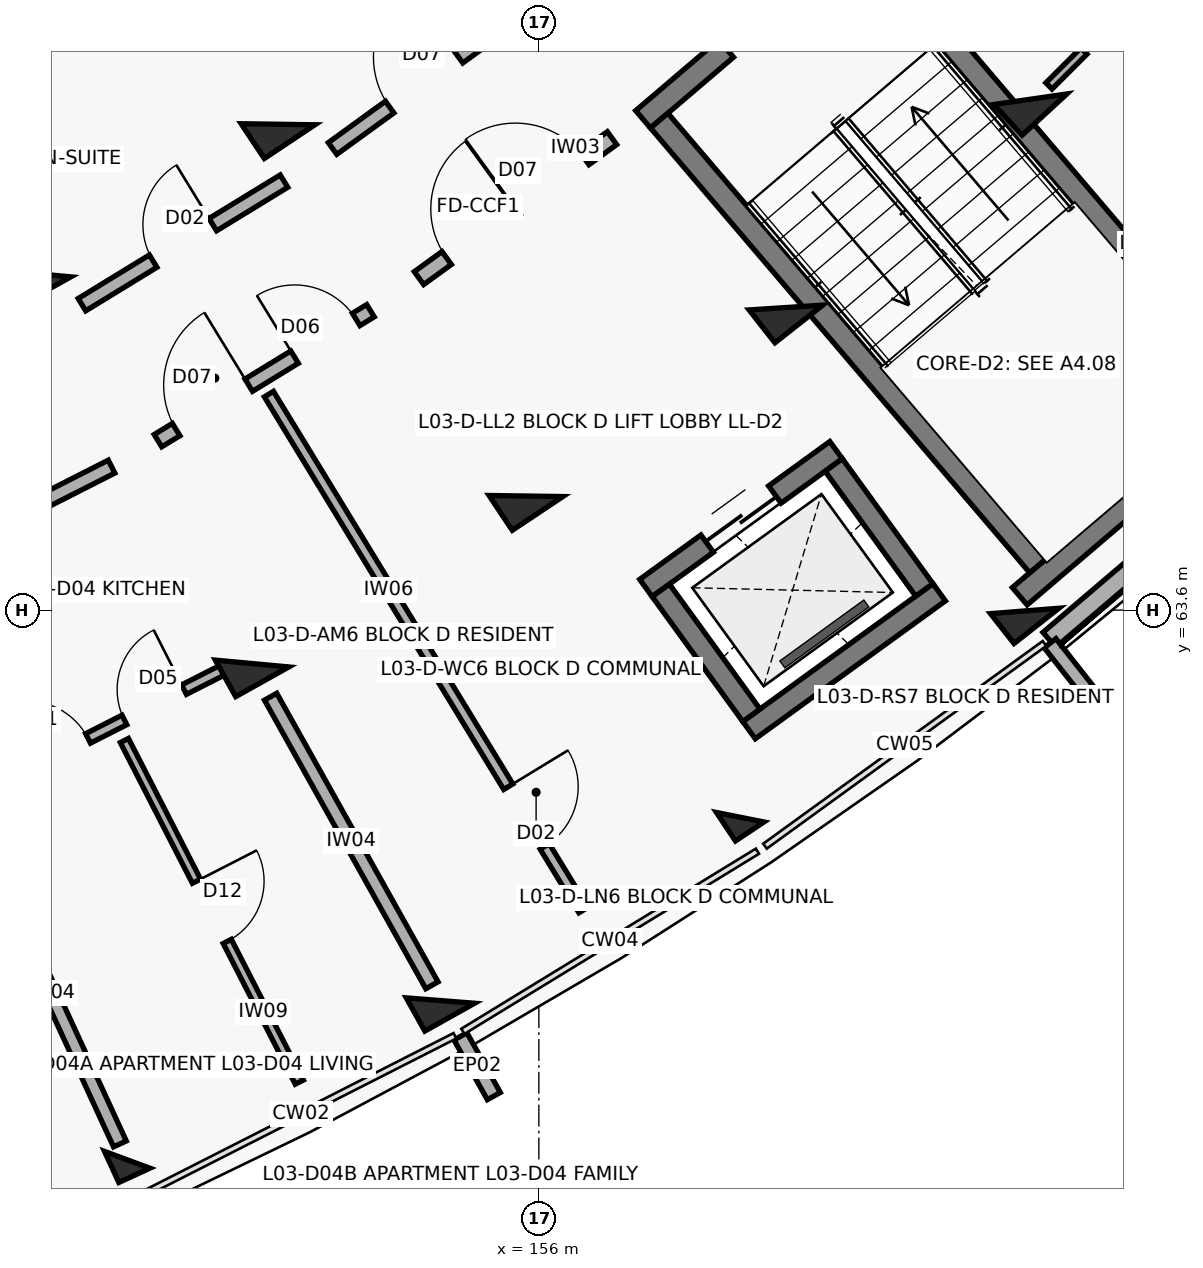
"""IFC4 building model, lengths in metres.
Left out: names, types, materials, properties, quantities, classifications, styles, units other than length and angle.
Written with IfcOpenShell. Run it as: python <this file> out.ifc"""

import sys

from ifc_helpers import new_model, si_unit, direction, frame, frame_2d, origin, origin_2d, place, context, subcontext, project, spatial, rectangle, extrude, element, fill, save


model = new_model("IFC4")
c1 = context("Model", 3, precision=1e-05, world=origin(), true_north=direction((0.0, 1.0)))
c2 = subcontext(c1, "Body", "Model", "MODEL_VIEW")
j1 = project(units=[si_unit("LENGTHUNIT", "METRE"), si_unit("PLANEANGLEUNIT", "RADIAN")], contexts=[c1])
p1 = place(None, origin())
s1 = spatial("IfcSite", under=j1, at=p1, CompositionType="ELEMENT")
p2 = place(p1, origin())
s2 = spatial("IfcBuilding", under=s1, at=p2, CompositionType="ELEMENT")
p3 = place(p2, frame((0.0, 0.0, 11.2)))
s3 = spatial("IfcBuildingStorey", under=s2, at=p3, CompositionType="ELEMENT", Elevation=11.2)
p4 = place(p3, frame((150.584, 56.367, 0.0), z_axis=(0.0, 0.0, 1.0), x_axis=(0.417867073801, -0.908508177527, 0.0)))
e1 = element("IfcColumn", 1, at=p4, inside=s3, PredefinedType="COLUMN", context=c2, shape_type="SweptSolid", body=[
    extrude(rectangle(XDim=0.45, YDim=0.45, at=origin_2d()), origin(), (0.0, 0.0, 1.0), 3.1),
])
for number, where, z_axis, x_axis in (
    (2, (149.358, 68.03, 0.0), (0.0, 0.0, 1.0), (0.488, -0.873, 0.0)),
    (3, (152.227, 62.897, 0.0), (0.0, 0.0, 1.0), (0.488, -0.873, 0.0)),
):
    element("IfcColumn", number, at=place(p3, frame(where, z_axis=z_axis, x_axis=x_axis)), inside=s3, PredefinedType="COLUMN", context=c2, shape_type="SweptSolid", body=[
        extrude(rectangle(XDim=0.55, YDim=0.8, at=origin_2d()), origin(), (0.0, 0.0, 1.0), 3.1),
    ])
p5 = place(p3, frame((154.705, 58.462, 0.0), z_axis=(0.0, 0.0, 1.0), x_axis=(0.487859659139, -0.87292207727, 0.0)))
e4 = element("IfcColumn", 4, at=p5, inside=s3, PredefinedType="COLUMN", context=c2, shape_type="SweptSolid", body=[
    extrude(rectangle(XDim=0.5, YDim=0.75, at=origin_2d()), origin(), (0.0, 0.0, 1.0), 3.1),
])
for number, where, z_axis, x_axis in (
    (5, (152.568, 69.993, 0.0), (0.0, 0.0, 1.0), (0.555, -0.832, 0.0)),
    (6, (155.831, 65.101, 0.0), (0.0, 0.0, 1.0), (0.555, -0.832, 0.0)),
):
    element("IfcColumn", number, at=place(p3, frame(where, z_axis=z_axis, x_axis=x_axis)), inside=s3, PredefinedType="COLUMN", context=c2, shape_type="SweptSolid", body=[
        extrude(rectangle(XDim=0.55, YDim=0.8, at=origin_2d()), origin(), (0.0, 0.0, 1.0), 3.1),
    ])
p6 = place(p3, frame((158.649, 60.875, 0.0), z_axis=(0.0, 0.0, 1.0), x_axis=(0.554844427448, -0.83195412213, 0.0)))
e7 = element("IfcColumn", 7, at=p6, inside=s3, PredefinedType="COLUMN", context=c2, shape_type="SweptSolid", body=[
    extrude(rectangle(XDim=0.45, YDim=0.45, at=origin_2d()), origin(), (0.0, 0.0, 1.0), 3.1),
])
p7 = place(p3, frame((159.25, 67.581, 0.0), z_axis=(0.0, 0.0, 1.0), x_axis=(0.618408395358, -0.785856893175, 0.0)))
e8 = element("IfcColumn", 8, at=p7, inside=s3, PredefinedType="COLUMN", context=c2, shape_type="SweptSolid", body=[
    extrude(rectangle(XDim=0.55, YDim=0.8, at=origin_2d()), origin(), (0.0, 0.0, 1.0), 3.1),
])
p8 = place(p3, frame((162.392, 63.589, 0.0), z_axis=(0.0, 0.0, 1.0), x_axis=(0.618408395358, -0.785856893175, 0.0)))
e9 = element("IfcColumn", 9, at=p8, inside=s3, PredefinedType="COLUMN", context=c2, shape_type="SweptSolid", body=[
    extrude(rectangle(XDim=0.5, YDim=0.75, at=origin_2d()), origin(), (0.0, 0.0, 1.0), 3.1),
])
p9 = place(p3, frame((162.465, 70.322, 0.0), z_axis=(0.0, 0.0, 1.0), x_axis=(0.678159669868, -0.73491459515, 0.0)))
e10 = element("IfcColumn", 10, at=p9, inside=s3, PredefinedType="COLUMN", context=c2, shape_type="SweptSolid", body=[
    extrude(rectangle(XDim=0.55, YDim=0.8, at=origin_2d()), origin(), (0.0, 0.0, 1.0), 3.1),
])
p10 = place(p3, frame((154.969, 57.991, 0.0), z_axis=(0.0, 0.0, 1.0), x_axis=(0.487967253808, -0.872861935939, 0.0)))
e11 = element("IfcWall", 11, at=p10, inside=s3, PredefinedType="PARAPET", context=c2, shape_type="SweptSolid", body=[
    extrude(rectangle(XDim=0.9, YDim=0.195, at=frame_2d((0.45, 0.0))), origin(), (0.0, 0.0, 1.0), 2.25),
])
p11 = place(p3, frame((147.765, 70.921, 0.0), z_axis=(0.0, 0.0, 1.0), x_axis=(0.85310231885, 0.521743647371, 0.0)))
e12 = element("IfcWall", 12, at=p11, inside=s3, PredefinedType="SOLIDWALL", context=c2, shape_type="SweptSolid", body=[
    extrude(rectangle(XDim=3.464, YDim=0.245, at=frame_2d((1.732, 0.0))), origin(), (0.0, 0.0, 1.0), 2.25),
])
p12 = place(p11, frame((0.4, 0.0, 0.0)))
e13 = element("IfcOpeningElement", 13, at=p12, cuts=e12, PredefinedType="OPENING", context=c2, shape_type="SweptSolid", body=[
    extrude(rectangle(XDim=1.1, YDim=2.15, at=frame_2d((0.55, 1.075))), frame((0.0, 0.133, 0.0), z_axis=(0.0, -1.0, 0.0), x_axis=(1.0, 0.0, 0.0)), (0.0, 0.0, 1.0), 0.265),
])
p13 = place(p3, frame((162.716, 63.209, 0.0), z_axis=(0.0, 0.0, 1.0), x_axis=(0.760968923704, 0.64878833001, 0.0)))
e14 = element("IfcWall", 14, at=p13, inside=s3, PredefinedType="SOLIDWALL", context=c2, shape_type="SweptSolid", body=[
    extrude(rectangle(XDim=4.623, YDim=0.258, at=frame_2d((2.311, 0.0))), origin(), (0.0, 0.0, 1.0), 2.25),
])
p14 = place(p3, frame((162.726, 63.164, 0.0), z_axis=(0.0, 0.0, 1.0), x_axis=(0.618456270212, -0.785819217019, 0.0)))
e15 = element("IfcWall", 15, at=p14, inside=s3, PredefinedType="PARAPET", context=c2, shape_type="SweptSolid", body=[
    extrude(rectangle(XDim=0.9, YDim=0.195, at=frame_2d((0.45, 0.0))), origin(), (0.0, 0.0, 1.0), 2.25),
])
p15 = place(p3, frame((157.372, 70.058, 0.0), z_axis=(0.0, 0.0, 1.0), x_axis=(0.760990583254, 0.648762924495, 0.0)))
e16 = element("IfcWall", 16, at=p15, inside=s3, PredefinedType="SHEAR", context=c2, shape_type="SweptSolid", body=[
    extrude(rectangle(XDim=3.87, YDim=0.3, at=frame_2d((1.935, 0.0))), origin(), (0.0, 0.0, 1.0), 3.1),
])
p16 = place(p15, frame((1.435, 0.0, 0.0)))
e17 = element("IfcOpeningElement", 17, at=p16, cuts=e16, PredefinedType="OPENING", context=c2, shape_type="SweptSolid", body=[
    extrude(rectangle(XDim=1.0, YDim=2.15, at=frame_2d((0.5, 1.075))), frame((0.0, 0.16, 0.0), z_axis=(0.0, -1.0, 0.0), x_axis=(1.0, 0.0, 0.0)), (0.0, 0.0, 1.0), 0.32),
])
p17 = place(p3, frame((162.327, 63.783, 0.0), z_axis=(0.0, 0.0, 1.0), x_axis=(0.760969560012, 0.648787583678, 0.0)))
e18 = element("IfcWall", 18, at=p17, inside=s3, PredefinedType="SHEAR", context=c2, shape_type="SweptSolid", body=[
    extrude(rectangle(XDim=4.47, YDim=0.3, at=frame_2d((2.235, 0.0))), origin(), (0.0, 0.0, 1.0), 3.1),
])
p18 = place(p3, frame((157.583, 70.041, 0.0), z_axis=(0.0, 0.0, 1.0), x_axis=(0.648762810187, -0.760990680704, 0.0)))
e19 = element("IfcWall", 19, at=p18, inside=s3, PredefinedType="SHEAR", context=c2, shape_type="SweptSolid", body=[
    extrude(rectangle(XDim=7.69, YDim=0.3, at=frame_2d((3.845, 0.0))), origin(), (0.0, 0.0, 1.0), 3.1),
])
p19 = place(p3, frame((160.3, 72.357, 0.0), z_axis=(0.0, 0.0, 1.0), x_axis=(0.648781194888, -0.760975006922, 0.0)))
e20 = element("IfcWall", 20, at=p19, inside=s3, PredefinedType="SHEAR", context=c2, shape_type="SweptSolid", body=[
    extrude(rectangle(XDim=7.69, YDim=0.3, at=frame_2d((3.845, 0.0))), origin(), (0.0, 0.0, 1.0), 3.1),
])
p20 = place(p3, frame((157.409, 63.89, 0.0), z_axis=(0.0, 0.0, 1.0), x_axis=(0.809510936031, 0.587104798521, 0.0)))
e21 = element("IfcWall", 21, at=p20, inside=s3, PredefinedType="SHEAR", context=c2, shape_type="SweptSolid", body=[
    extrude(rectangle(XDim=3.09, YDim=0.28, at=frame_2d((1.545, 0.0))), origin(), (0.0, 0.0, 1.0), 3.1),
])
p21 = place(p20, frame((0.995, 0.0, 0.0)))
e22 = element("IfcOpeningElement", 22, at=p21, cuts=e21, PredefinedType="OPENING", context=c2, shape_type="SweptSolid", body=[
    extrude(rectangle(XDim=1.1, YDim=2.15, at=frame_2d((0.55, 1.075))), frame((0.0, 0.15, 0.0), z_axis=(0.0, -1.0, 0.0), x_axis=(1.0, 0.0, 0.0)), (0.0, 0.0, 1.0), 0.3),
])
p22 = place(p3, frame((158.765, 62.021, 0.0), z_axis=(0.0, 0.0, 1.0), x_axis=(0.809548485838, 0.587053020669, 0.0)))
e23 = element("IfcWall", 23, at=p22, inside=s3, PredefinedType="SHEAR", context=c2, shape_type="SweptSolid", body=[
    extrude(rectangle(XDim=3.09, YDim=0.28, at=frame_2d((1.545, 0.0))), origin(), (0.0, 0.0, 1.0), 3.1),
])
p23 = place(p3, frame((157.604, 63.859, 0.0), z_axis=(0.0, 0.0, 1.0), x_axis=(0.587127188998, -0.809494696671, 0.0)))
e24 = element("IfcWall", 24, at=p23, inside=s3, PredefinedType="SHEAR", context=c2, shape_type="SweptSolid", body=[
    extrude(rectangle(XDim=2.03, YDim=0.28, at=frame_2d((1.015, 0.0))), origin(), (0.0, 0.0, 1.0), 3.1),
])
p24 = place(p3, frame((159.879, 65.509, 0.0), z_axis=(0.0, 0.0, 1.0), x_axis=(0.58704837408, -0.809551855344, 0.0)))
e25 = element("IfcWall", 25, at=p24, inside=s3, PredefinedType="SHEAR", context=c2, shape_type="SweptSolid", body=[
    extrude(rectangle(XDim=2.03, YDim=0.28, at=frame_2d((1.015, 0.0))), origin(), (0.0, 0.0, 1.0), 3.1),
])
p25 = place(p3, frame((147.457, 64.003, 0.0), z_axis=(0.0, 0.0, 1.0), x_axis=(0.891412167565, 0.45319349898, 0.0)))
e26 = element("IfcWall", 26, at=p25, inside=s3, PredefinedType="SOLIDWALL", context=c2, shape_type="SweptSolid", body=[
    extrude(rectangle(XDim=3.277, YDim=0.19, at=frame_2d((1.639, 0.0))), origin(), (0.0, 0.0, 1.0), 2.08),
])
p26 = place(p25, frame((1.148, 0.0, 0.0)))
e27 = element("IfcOpeningElement", 27, at=p26, cuts=e26, PredefinedType="OPENING", context=c2, shape_type="SweptSolid", body=[
    extrude(rectangle(XDim=0.98, YDim=2.15, at=frame_2d((0.49, 1.075))), frame((0.0, 0.105, 0.0), z_axis=(0.0, -1.0, 0.0), x_axis=(1.0, 0.0, 0.0)), (0.0, 0.0, 1.0), 0.21),
])
p27 = place(p3, frame((148.687, 61.209, 0.0), z_axis=(0.0, 0.0, 1.0), x_axis=(0.891396224028, 0.453224857866, 0.0)))
e28 = element("IfcWall", 28, at=p27, inside=s3, PredefinedType="PARTITIONING", context=c2, shape_type="SweptSolid", body=[
    extrude(rectangle(XDim=3.617, YDim=0.14, at=frame_2d((1.808, 0.0))), origin(), (0.0, 0.0, 1.0), 2.08),
])
p28 = place(p27, frame((0.65, 0.0, 0.0)))
e29 = element("IfcOpeningElement", 29, at=p28, cuts=e28, PredefinedType="OPENING", context=c2, shape_type="SweptSolid", body=[
    extrude(rectangle(XDim=0.9, YDim=2.1, at=frame_2d((0.45, 1.05))), frame((0.0, 0.08, 0.0), z_axis=(0.0, -1.0, 0.0), x_axis=(1.0, 0.0, 0.0)), (0.0, 0.0, 1.0), 0.16),
])
p29 = place(p27, frame((2.086, 0.0, 0.0)))
e30 = element("IfcOpeningElement", 30, at=p29, cuts=e28, PredefinedType="OPENING", context=c2, shape_type="SweptSolid", body=[
    extrude(rectangle(XDim=0.88, YDim=2.1, at=frame_2d((0.44, 1.05))), frame((0.0, 0.08, 0.0), z_axis=(0.0, -1.0, 0.0), x_axis=(1.0, 0.0, 0.0)), (0.0, 0.0, 1.0), 0.16),
])
p30 = place(p3, frame((150.547, 61.884, 0.0), z_axis=(0.0, 0.0, 1.0), x_axis=(0.455778725258, -0.89009311513, 0.0)))
e31 = element("IfcWall", 31, at=p30, inside=s3, PredefinedType="PARTITIONING", context=c2, shape_type="SweptSolid", body=[
    extrude(rectangle(XDim=5.05, YDim=0.12, at=frame_2d((2.525, 0.0))), origin(), (0.0, 0.0, 1.0), 2.08),
])
p31 = place(p30, frame((2.08, 0.0, 0.0)))
e32 = element("IfcOpeningElement", 32, at=p31, cuts=e31, PredefinedType="OPENING", context=c2, shape_type="SweptSolid", body=[
    extrude(rectangle(XDim=0.89, YDim=2.1, at=frame_2d((0.445, 1.05))), frame((0.0, 0.07, 0.0), z_axis=(0.0, -1.0, 0.0), x_axis=(1.0, 0.0, 0.0)), (0.0, 0.0, 1.0), 0.14),
])
p32 = place(p3, frame((148.67, 60.528, 0.0), z_axis=(0.0, 0.0, 1.0), x_axis=(0.417837051164, -0.908521985796, 0.0)))
e33 = element("IfcWall", 33, at=p32, inside=s3, PredefinedType="SOLIDWALL", context=c2, shape_type="SweptSolid", body=[
    extrude(rectangle(XDim=4.35, YDim=0.185, at=frame_2d((2.175, 0.0))), origin(), (0.0, 0.0, 1.0), 2.08),
])
p33 = place(p3, frame((150.989, 65.829, 0.0), z_axis=(0.0, 0.0, 1.0), x_axis=(0.853090237845, 0.521763400492, 0.0)))
e34 = element("IfcWall", 34, at=p33, inside=s3, PredefinedType="SOLIDWALL", context=c2, shape_type="SweptSolid", body=[
    extrude(rectangle(XDim=3.277, YDim=0.19, at=frame_2d((1.638, 0.0))), origin(), (0.0, 0.0, 1.0), 2.08),
])
p34 = place(p33, frame((0.28, 0.0, 0.0)))
e35 = element("IfcOpeningElement", 35, at=p34, cuts=e34, PredefinedType="OPENING", context=c2, shape_type="SweptSolid", body=[
    extrude(rectangle(XDim=1.12, YDim=2.15, at=frame_2d((0.56, 1.075))), frame((0.0, 0.105, 0.0), z_axis=(0.0, -1.0, 0.0), x_axis=(1.0, 0.0, 0.0)), (0.0, 0.0, 1.0), 0.21),
])
p35 = place(p33, frame((2.107, 0.0, 0.0)))
e36 = element("IfcOpeningElement", 36, at=p35, cuts=e34, PredefinedType="OPENING", context=c2, shape_type="SweptSolid", body=[
    extrude(rectangle(XDim=0.95, YDim=2.1, at=frame_2d((0.475, 1.05))), frame((0.0, 0.105, 0.0), z_axis=(0.0, -1.0, 0.0), x_axis=(1.0, 0.0, 0.0)), (0.0, 0.0, 1.0), 0.21),
])
p36 = place(p3, frame((149.989, 67.619, 0.0), z_axis=(0.0, 0.0, 1.0), x_axis=(0.853121049608, 0.5217130195, 0.0)))
e37 = element("IfcWall", 37, at=p36, inside=s3, PredefinedType="SOLIDWALL", context=c2, shape_type="SweptSolid", body=[
    extrude(rectangle(XDim=3.116, YDim=0.19, at=frame_2d((1.558, 0.0))), origin(), (0.0, 0.0, 1.0), 2.08),
])
p37 = place(p36, frame((1.098, 0.0, 0.0)))
e38 = element("IfcOpeningElement", 38, at=p37, cuts=e37, PredefinedType="OPENING", context=c2, shape_type="SweptSolid", body=[
    extrude(rectangle(XDim=0.92, YDim=2.1, at=frame_2d((0.46, 1.05))), frame((0.0, 0.105, 0.0), z_axis=(0.0, -1.0, 0.0), x_axis=(1.0, 0.0, 0.0)), (0.0, 0.0, 1.0), 0.21),
])
p38 = place(p3, frame((152.448, 66.442, 0.0), z_axis=(0.0, 0.0, 1.0), x_axis=(0.520511872578, -0.853854431683, 0.0)))
e39 = element("IfcWall", 39, at=p38, inside=s3, PredefinedType="PARTITIONING", context=c2, shape_type="SweptSolid", body=[
    extrude(rectangle(XDim=7.95, YDim=0.14, at=frame_2d((3.975, 0.0))), origin(), (0.0, 0.0, 1.0), 2.08),
])
p39 = place(p38, frame((6.05, 0.0, 0.0)))
e40 = element("IfcOpeningElement", 40, at=p39, cuts=e39, PredefinedType="OPENING", context=c2, shape_type="SweptSolid", body=[
    extrude(rectangle(XDim=0.92, YDim=2.1, at=frame_2d((0.46, 1.05))), frame((0.0, 0.08, 0.0), z_axis=(0.0, -1.0, 0.0), x_axis=(1.0, 0.0, 0.0)), (0.0, 0.0, 1.0), 0.16),
])
p40 = place(p3, frame((152.471, 62.46, 0.0), z_axis=(0.0, 0.0, 1.0), x_axis=(0.487866639184, -0.872918176218, 0.0)))
e41 = element("IfcWall", 41, at=p40, inside=s3, PredefinedType="SOLIDWALL", context=c2, shape_type="SweptSolid", body=[
    extrude(rectangle(XDim=4.35, YDim=0.185, at=frame_2d((2.175, 0.0))), origin(), (0.0, 0.0, 1.0), 2.08),
])
p41 = place(p3, frame((154.423, 67.968, 0.0), z_axis=(0.0, 0.0, 1.0), x_axis=(0.809516127005, 0.587097641043, 0.0)))
e42 = element("IfcWall", 42, at=p41, inside=s3, PredefinedType="SOLIDWALL", context=c2, shape_type="SweptSolid", body=[
    extrude(rectangle(XDim=3.137, YDim=0.21, at=frame_2d((1.569, 0.0))), origin(), (0.0, 0.0, 1.0), 2.08),
])
p42 = place(p41, frame((0.45, 0.0, 0.0)))
e43 = element("IfcOpeningElement", 43, at=p42, cuts=e42, PredefinedType="OPENING", context=c2, shape_type="SweptSolid", body=[
    extrude(rectangle(XDim=1.1, YDim=2.15, at=frame_2d((0.55, 1.075))), frame((0.0, 0.115, 0.0), z_axis=(0.0, -1.0, 0.0), x_axis=(1.0, 0.0, 0.0)), (0.0, 0.0, 1.0), 0.23),
])
p43 = place(p41, frame((1.567, 0.0, 0.0)))
e44 = element("IfcOpeningElement", 44, at=p43, cuts=e42, PredefinedType="OPENING", context=c2, shape_type="SweptSolid", body=[
    extrude(rectangle(XDim=1.12, YDim=2.15, at=frame_2d((0.56, 1.075))), frame((0.0, 0.115, 0.0), z_axis=(0.0, -1.0, 0.0), x_axis=(1.0, 0.0, 0.0)), (0.0, 0.0, 1.0), 0.23),
])
p44 = place(p3, frame((153.285, 69.674, 0.0), z_axis=(0.0, 0.0, 1.0), x_axis=(0.809505174959, 0.587112741911, 0.0)))
e45 = element("IfcWall", 45, at=p44, inside=s3, PredefinedType="SOLIDWALL", context=c2, shape_type="SweptSolid", body=[
    extrude(rectangle(XDim=2.976, YDim=0.19, at=frame_2d((1.488, 0.0))), origin(), (0.0, 0.0, 1.0), 2.08),
])
p45 = place(p44, frame((0.928, 0.0, 0.0)))
e46 = element("IfcOpeningElement", 46, at=p45, cuts=e45, PredefinedType="OPENING", context=c2, shape_type="SweptSolid", body=[
    extrude(rectangle(XDim=1.12, YDim=2.15, at=frame_2d((0.56, 1.075))), frame((0.0, 0.105, 0.0), z_axis=(0.0, -1.0, 0.0), x_axis=(1.0, 0.0, 0.0)), (0.0, 0.0, 1.0), 0.21),
])
p46 = place(p3, frame((162.711, 70.497, 0.0), z_axis=(0.0, 0.0, 1.0), x_axis=(0.70774573777, 0.706467246706, 0.0)))
e47 = element("IfcWall", 47, at=p46, inside=s3, PredefinedType="PARTITIONING", context=c2, shape_type="SweptSolid", body=[
    extrude(rectangle(XDim=3.628, YDim=0.115, at=frame_2d((1.814, 0.0))), origin(), (0.0, 0.0, 1.0), 2.08),
])
p47 = place(p46, frame((0.65, 0.0, 0.0)))
e48 = element("IfcOpeningElement", 48, at=p47, cuts=e47, PredefinedType="OPENING", context=c2, shape_type="SweptSolid", body=[
    extrude(rectangle(XDim=0.9, YDim=2.1, at=frame_2d((0.45, 1.05))), frame((0.0, 0.067, 0.0), z_axis=(0.0, -1.0, 0.0), x_axis=(1.0, 0.0, 0.0)), (0.0, 0.0, 1.0), 0.135),
])
p48 = place(p46, frame((2.098, 0.0, 0.0)))
e49 = element("IfcOpeningElement", 49, at=p48, cuts=e47, PredefinedType="OPENING", context=c2, shape_type="SweptSolid", body=[
    extrude(rectangle(XDim=0.88, YDim=2.1, at=frame_2d((0.44, 1.05))), frame((0.0, 0.067, 0.0), z_axis=(0.0, -1.0, 0.0), x_axis=(1.0, 0.0, 0.0)), (0.0, 0.0, 1.0), 0.135),
])
p49 = place(p21, origin())
e50 = element("IfcDoor", 50, at=p49, inside=s3, OperationType="DOUBLE_DOOR_SLIDING", PredefinedType="DOOR", context=c2, shape_type="SweptSolid", body=[
    extrude(rectangle(XDim=1.1, YDim=2.15, at=frame_2d((0.55, 1.075))), frame((0.0, 0.025, 0.0), z_axis=(0.0, -1.0, 0.0), x_axis=(1.0, 0.0, 0.0)), (0.0, 0.0, 1.0), 0.05),
])
fill(e22, e50)
p50 = place(p28, origin())
e51 = element("IfcDoor", 51, at=p50, inside=s3, OperationType="SINGLE_SWING_LEFT", PredefinedType="DOOR", context=c2, shape_type="SweptSolid", body=[
    extrude(rectangle(XDim=0.9, YDim=2.1, at=frame_2d((0.45, 1.05))), frame((0.0, 0.025, 0.0), z_axis=(0.0, -1.0, 0.0), x_axis=(1.0, 0.0, 0.0)), (0.0, 0.0, 1.0), 0.05),
])
fill(e29, e51)
p51 = place(p29, origin())
e52 = element("IfcDoor", 52, at=p51, inside=s3, OperationType="SINGLE_SWING_RIGHT", PredefinedType="DOOR", context=c2, shape_type="SweptSolid", body=[
    extrude(rectangle(XDim=0.88, YDim=2.1, at=frame_2d((0.44, 1.05))), frame((0.0, 0.025, 0.0), z_axis=(0.0, -1.0, 0.0), x_axis=(1.0, 0.0, 0.0)), (0.0, 0.0, 1.0), 0.05),
])
fill(e30, e52)
p52 = place(p31, origin())
e53 = element("IfcDoor", 53, at=p52, inside=s3, OperationType="SINGLE_SWING_LEFT", PredefinedType="DOOR", context=c2, shape_type="SweptSolid", body=[
    extrude(rectangle(XDim=0.89, YDim=2.1, at=frame_2d((0.445, 1.05))), frame((0.0, 0.025, 0.0), z_axis=(0.0, -1.0, 0.0), x_axis=(1.0, 0.0, 0.0)), (0.0, 0.0, 1.0), 0.05),
])
fill(e32, e53)
p53 = place(p34, origin())
e54 = element("IfcDoor", 54, at=p53, inside=s3, OperationType="SINGLE_SWING_RIGHT", PredefinedType="DOOR", context=c2, shape_type="SweptSolid", body=[
    extrude(rectangle(XDim=1.12, YDim=2.15, at=frame_2d((0.56, 1.075))), frame((0.0, 0.025, 0.0), z_axis=(0.0, -1.0, 0.0), x_axis=(1.0, 0.0, 0.0)), (0.0, 0.0, 1.0), 0.05),
])
fill(e35, e54)
p54 = place(p35, origin())
e55 = element("IfcDoor", 55, at=p54, inside=s3, OperationType="SINGLE_SWING_LEFT", PredefinedType="DOOR", context=c2, shape_type="SweptSolid", body=[
    extrude(rectangle(XDim=0.95, YDim=2.1, at=frame_2d((0.475, 1.05))), frame((0.0, 0.025, 0.0), z_axis=(0.0, -1.0, 0.0), x_axis=(1.0, 0.0, 0.0)), (0.0, 0.0, 1.0), 0.05),
])
fill(e36, e55)
p55 = place(p37, origin())
e56 = element("IfcDoor", 56, at=p55, inside=s3, OperationType="SINGLE_SWING_RIGHT", PredefinedType="DOOR", context=c2, shape_type="SweptSolid", body=[
    extrude(rectangle(XDim=0.92, YDim=2.1, at=frame_2d((0.46, 1.05))), frame((0.0, 0.025, 0.0), z_axis=(0.0, -1.0, 0.0), x_axis=(1.0, 0.0, 0.0)), (0.0, 0.0, 1.0), 0.05),
])
fill(e38, e56)
p56 = place(p39, origin())
e57 = element("IfcDoor", 57, at=p56, inside=s3, OperationType="SINGLE_SWING_LEFT", PredefinedType="DOOR", context=c2, shape_type="SweptSolid", body=[
    extrude(rectangle(XDim=0.92, YDim=2.1, at=frame_2d((0.46, 1.05))), frame((0.0, 0.025, 0.0), z_axis=(0.0, -1.0, 0.0), x_axis=(1.0, 0.0, 0.0)), (0.0, 0.0, 1.0), 0.05),
])
fill(e40, e57)
p57 = place(p42, origin())
e58 = element("IfcDoor", 58, at=p57, inside=s3, OperationType="SINGLE_SWING_RIGHT", PredefinedType="DOOR", context=c2, shape_type="SweptSolid", body=[
    extrude(rectangle(XDim=1.1, YDim=2.15, at=frame_2d((0.55, 1.075))), frame((0.0, 0.025, 0.0), z_axis=(0.0, -1.0, 0.0), x_axis=(1.0, 0.0, 0.0)), (0.0, 0.0, 1.0), 0.05),
])
fill(e43, e58)
p58 = place(p43, origin())
e59 = element("IfcDoor", 59, at=p58, inside=s3, OperationType="SINGLE_SWING_LEFT", PredefinedType="DOOR", context=c2, shape_type="SweptSolid", body=[
    extrude(rectangle(XDim=1.12, YDim=2.15, at=frame_2d((0.56, 1.075))), frame((0.0, 0.025, 0.0), z_axis=(0.0, -1.0, 0.0), x_axis=(1.0, 0.0, 0.0)), (0.0, 0.0, 1.0), 0.05),
])
fill(e44, e59)
p59 = place(p45, origin())
e60 = element("IfcDoor", 60, at=p59, inside=s3, OperationType="SINGLE_SWING_RIGHT", PredefinedType="DOOR", context=c2, shape_type="SweptSolid", body=[
    extrude(rectangle(XDim=1.12, YDim=2.15, at=frame_2d((0.56, 1.075))), frame((0.0, 0.025, 0.0), z_axis=(0.0, -1.0, 0.0), x_axis=(1.0, 0.0, 0.0)), (0.0, 0.0, 1.0), 0.05),
])
fill(e46, e60)
p60 = place(p47, origin())
e61 = element("IfcDoor", 61, at=p60, inside=s3, OperationType="SINGLE_SWING_LEFT", PredefinedType="DOOR", context=c2, shape_type="SweptSolid", body=[
    extrude(rectangle(XDim=0.9, YDim=2.1, at=frame_2d((0.45, 1.05))), frame((0.0, 0.025, 0.0), z_axis=(0.0, -1.0, 0.0), x_axis=(1.0, 0.0, 0.0)), (0.0, 0.0, 1.0), 0.05),
])
fill(e48, e61)
save(model, sys.argv[1])
